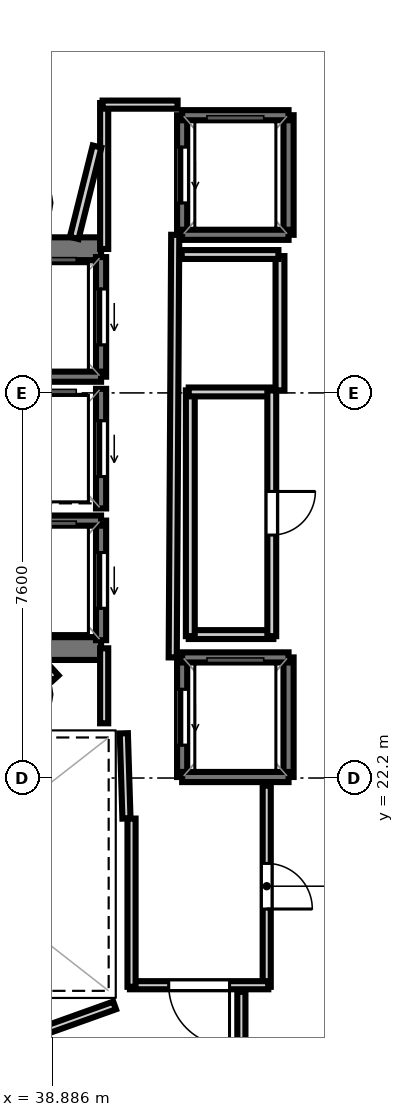
"""IFC4 building model, lengths in metres.
Left out: names, types, materials, properties, quantities, classifications, styles, units other than length and angle.
Written with IfcOpenShell. Run it as: python <this file> out.ifc"""

import sys

from ifc_helpers import new_model, si_unit, direction, frame, frame_2d, origin, place, context, subcontext, project, spatial, rectangle, extrude, element, fill, save


model = new_model("IFC4")
c1 = context("Model", 3, precision=1e-05, world=origin(), true_north=direction((0.0, 1.0)))
c2 = subcontext(c1, "Body", "Model", "MODEL_VIEW")
j1 = project(units=[si_unit("LENGTHUNIT", "METRE"), si_unit("PLANEANGLEUNIT", "RADIAN")], contexts=[c1])
p1 = place(None, origin())
s1 = spatial("IfcSite", under=j1, at=p1, CompositionType="ELEMENT")
p2 = place(p1, origin())
s2 = spatial("IfcBuilding", under=s1, at=p2, CompositionType="ELEMENT")
p3 = place(p2, frame((0.0, 0.0, 310.2)))
s3 = spatial("IfcBuildingStorey", under=s2, at=p3, CompositionType="ELEMENT", Elevation=310.2)
p4 = place(p3, frame((29.33, 32.645, 0.0), z_axis=(0.0, 0.0, 1.0), x_axis=(1.0, 0.0, 0.0)))
e1 = element("IfcWall", 1, at=p4, inside=s3, PredefinedType="SHEAR", context=c2, shape_type="SweptSolid", body=[
    extrude(rectangle(XDim=10.52, YDim=0.45, at=frame_2d((5.26, 0.0))), origin(), (0.0, 0.0, 1.0), 3.52),
])
p5 = place(p4, frame((0.895, 0.0, 0.0)))
e2 = element("IfcOpeningElement", 2, at=p5, cuts=e1, PredefinedType="OPENING", context=c2, shape_type="SweptSolid", body=[
    extrude(rectangle(XDim=1.25, YDim=2.15, at=frame_2d((0.625, 1.075))), frame((0.0, 0.235, 0.0), z_axis=(0.0, -1.0, 0.0), x_axis=(1.0, 0.0, 0.0)), (0.0, 0.0, 1.0), 0.47),
])
p6 = place(p3, frame((29.33, 24.755, 0.0), z_axis=(0.0, 0.0, 1.0), x_axis=(1.0, 0.0, 0.0)))
e3 = element("IfcWall", 3, at=p6, inside=s3, PredefinedType="SHEAR", context=c2, shape_type="SweptSolid", body=[
    extrude(rectangle(XDim=10.52, YDim=0.45, at=frame_2d((5.26, 0.0))), origin(), (0.0, 0.0, 1.0), 3.52),
])
p7 = place(p6, frame((0.695, 0.0, 0.0)))
e4 = element("IfcOpeningElement", 4, at=p7, cuts=e3, PredefinedType="OPENING", context=c2, shape_type="SweptSolid", body=[
    extrude(rectangle(XDim=1.25, YDim=2.15, at=frame_2d((0.625, 1.075))), frame((0.0, 0.235, 0.0), z_axis=(0.0, -1.0, 0.0), x_axis=(1.0, 0.0, 0.0)), (0.0, 0.0, 1.0), 0.47),
])
p8 = place(p3, frame((39.85, 30.12, 0.0), z_axis=(0.0, 0.0, 1.0), x_axis=(0.0, 1.0, 0.0)))
e5 = element("IfcWall", 5, at=p8, inside=s3, PredefinedType="SOLIDWALL", context=c2, shape_type="SweptSolid", body=[
    extrude(rectangle(XDim=2.36, YDim=0.2, at=frame_2d((1.18, 0.0))), origin(), (0.0, 0.0, 1.0), 3.52),
])
p9 = place(p8, frame((0.63, 0.0, 0.0)))
e6 = element("IfcOpeningElement", 6, at=p9, cuts=e5, PredefinedType="OPENING", context=c2, shape_type="SweptSolid", body=[
    extrude(rectangle(XDim=1.1, YDim=2.15, at=frame_2d((0.55, 1.075))), frame((0.0, 0.11, 0.0), z_axis=(0.0, -1.0, 0.0), x_axis=(1.0, 0.0, 0.0)), (0.0, 0.0, 1.0), 0.22),
])
p10 = place(p3, frame((37.75, 30.12, 0.0), z_axis=(0.0, 0.0, 1.0), x_axis=(1.0, 0.0, 0.0)))
e7 = element("IfcWall", 7, at=p10, inside=s3, PredefinedType="SOLIDWALL", context=c2, shape_type="SweptSolid", body=[
    extrude(rectangle(XDim=2.1, YDim=0.2, at=frame_2d((1.05, 0.0))), origin(), (0.0, 0.0, 1.0), 3.52),
])
p11 = place(p3, frame((39.85, 24.92, 0.0), z_axis=(0.0, 0.0, 1.0), x_axis=(0.0, 1.0, 0.0)))
e8 = element("IfcWall", 8, at=p11, inside=s3, PredefinedType="SOLIDWALL", context=c2, shape_type="SweptSolid", body=[
    extrude(rectangle(XDim=2.36, YDim=0.2, at=frame_2d((1.18, 0.0))), origin(), (0.0, 0.0, 1.0), 3.52),
])
p12 = place(p11, frame((0.63, 0.0, 0.0)))
e9 = element("IfcOpeningElement", 9, at=p12, cuts=e8, PredefinedType="OPENING", context=c2, shape_type="SweptSolid", body=[
    extrude(rectangle(XDim=1.1, YDim=2.15, at=frame_2d((0.55, 1.075))), frame((0.0, 0.11, 0.0), z_axis=(0.0, -1.0, 0.0), x_axis=(1.0, 0.0, 0.0)), (0.0, 0.0, 1.0), 0.22),
])
p13 = place(p3, frame((37.75, 27.28, 0.0), z_axis=(0.0, 0.0, 1.0), x_axis=(1.0, 0.0, 0.0)))
e10 = element("IfcWall", 10, at=p13, inside=s3, PredefinedType="SOLIDWALL", context=c2, shape_type="SweptSolid", body=[
    extrude(rectangle(XDim=2.1, YDim=0.2, at=frame_2d((1.05, 0.0))), origin(), (0.0, 0.0, 1.0), 3.52),
])
p14 = place(p3, frame((39.85, 27.52, 0.0), z_axis=(0.0, 0.0, 1.0), x_axis=(0.0, 1.0, 0.0)))
e11 = element("IfcWall", 11, at=p14, inside=s3, PredefinedType="SOLIDWALL", context=c2, shape_type="SweptSolid", body=[
    extrude(rectangle(XDim=2.36, YDim=0.2, at=frame_2d((1.18, 0.0))), origin(), (0.0, 0.0, 1.0), 3.52),
])
p15 = place(p14, frame((0.63, 0.0, 0.0)))
e12 = element("IfcOpeningElement", 12, at=p15, cuts=e11, PredefinedType="OPENING", context=c2, shape_type="SweptSolid", body=[
    extrude(rectangle(XDim=1.1, YDim=2.15, at=frame_2d((0.55, 1.075))), frame((0.0, 0.11, 0.0), z_axis=(0.0, -1.0, 0.0), x_axis=(1.0, 0.0, 0.0)), (0.0, 0.0, 1.0), 0.22),
])
p16 = place(p3, frame((43.55, 22.22, 0.0), z_axis=(0.0, 0.0, 1.0), x_axis=(0.0, 1.0, 0.0)))
e13 = element("IfcWall", 13, at=p16, inside=s3, PredefinedType="SOLIDWALL", context=c2, shape_type="SweptSolid", body=[
    extrude(rectangle(XDim=2.36, YDim=0.2, at=frame_2d((1.18, 0.0))), origin(), (0.0, 0.0, 1.0), 3.52),
])
p17 = place(p3, frame((41.45, 22.22, 0.0), z_axis=(0.0, 0.0, 1.0), x_axis=(0.0, 1.0, 0.0)))
e14 = element("IfcWall", 14, at=p17, inside=s3, PredefinedType="SOLIDWALL", context=c2, shape_type="SweptSolid", body=[
    extrude(rectangle(XDim=2.36, YDim=0.2, at=frame_2d((1.18, 0.0))), origin(), (0.0, 0.0, 1.0), 3.52),
])
p18 = place(p17, frame((0.63, 0.0, 0.0)))
e15 = element("IfcOpeningElement", 15, at=p18, cuts=e14, PredefinedType="OPENING", context=c2, shape_type="SweptSolid", body=[
    extrude(rectangle(XDim=1.1, YDim=2.15, at=frame_2d((0.55, 1.075))), frame((0.0, 0.11, 0.0), z_axis=(0.0, -1.0, 0.0), x_axis=(1.0, 0.0, 0.0)), (0.0, 0.0, 1.0), 0.22),
])
for number, where, z_axis, x_axis in (
    (16, (41.45, 24.58, 0.0), (0.0, 0.0, 1.0), (1.0, 0.0, 0.0)),
    (17, (41.45, 22.22, 0.0), (0.0, 0.0, 1.0), (1.0, 0.0, 0.0)),
):
    element("IfcWall", number, at=place(p3, frame(where, z_axis=z_axis, x_axis=x_axis)), inside=s3, PredefinedType="SOLIDWALL", context=c2, shape_type="SweptSolid", body=[
        extrude(rectangle(XDim=2.1, YDim=0.2, at=frame_2d((1.05, 0.0))), origin(), (0.0, 0.0, 1.0), 3.52),
    ])
p19 = place(p3, frame((43.55, 32.92, 0.0), z_axis=(0.0, 0.0, 1.0), x_axis=(0.0, 1.0, 0.0)))
e18 = element("IfcWall", 18, at=p19, inside=s3, PredefinedType="SOLIDWALL", context=c2, shape_type="SweptSolid", body=[
    extrude(rectangle(XDim=2.36, YDim=0.2, at=frame_2d((1.18, 0.0))), origin(), (0.0, 0.0, 1.0), 3.52),
])
p20 = place(p3, frame((41.45, 32.92, 0.0), z_axis=(0.0, 0.0, 1.0), x_axis=(0.0, 1.0, 0.0)))
e19 = element("IfcWall", 19, at=p20, inside=s3, PredefinedType="SOLIDWALL", context=c2, shape_type="SweptSolid", body=[
    extrude(rectangle(XDim=2.36, YDim=0.2, at=frame_2d((1.18, 0.0))), origin(), (0.0, 0.0, 1.0), 3.52),
])
p21 = place(p20, frame((0.63, 0.0, 0.0)))
e20 = element("IfcOpeningElement", 20, at=p21, cuts=e19, PredefinedType="OPENING", context=c2, shape_type="SweptSolid", body=[
    extrude(rectangle(XDim=1.1, YDim=2.15, at=frame_2d((0.55, 1.075))), frame((0.0, 0.11, 0.0), z_axis=(0.0, -1.0, 0.0), x_axis=(1.0, 0.0, 0.0)), (0.0, 0.0, 1.0), 0.22),
])
for number, where, z_axis, x_axis in (
    (21, (41.45, 35.28, 0.0), (0.0, 0.0, 1.0), (1.0, 0.0, 0.0)),
    (22, (41.45, 32.92, 0.0), (0.0, 0.0, 1.0), (1.0, 0.0, 0.0)),
):
    element("IfcWall", number, at=place(p3, frame(where, z_axis=z_axis, x_axis=x_axis)), inside=s3, PredefinedType="SOLIDWALL", context=c2, shape_type="SweptSolid", body=[
        extrude(rectangle(XDim=2.1, YDim=0.2, at=frame_2d((1.05, 0.0))), origin(), (0.0, 0.0, 1.0), 3.52),
    ])
p22 = place(p3, frame((40.351, 21.401, 0.0), z_axis=(0.0, 0.0, 1.0), x_axis=(-0.031058045979, 0.999517582527, 0.0)))
e23 = element("IfcWall", 23, at=p22, inside=s3, PredefinedType="PARTITIONING", context=c2, shape_type="SweptSolid", body=[
    extrude(rectangle(XDim=1.682, YDim=0.16, at=frame_2d((0.841, 0.0))), origin(), (0.0, 0.0, 1.0), 2.84),
])
p23 = place(p3, frame((39.911, 23.28, 0.0), z_axis=(0.0, 0.0, 1.0), x_axis=(0.0, 1.0, 0.0)))
e24 = element("IfcWall", 24, at=p23, inside=s3, PredefinedType="PARTITIONING", context=c2, shape_type="SweptSolid", body=[
    extrude(rectangle(XDim=1.48, YDim=0.16, at=frame_2d((0.74, 0.0))), origin(), (0.0, 0.0, 1.0), 2.84),
])
p24 = place(p3, frame((39.911, 32.64, 0.0), z_axis=(0.0, 0.0, 1.0), x_axis=(0.0, 1.0, 0.0)))
e25 = element("IfcWall", 25, at=p24, inside=s3, PredefinedType="PARTITIONING", context=c2, shape_type="SweptSolid", body=[
    extrude(rectangle(XDim=2.88, YDim=0.16, at=frame_2d((1.44, 0.0))), origin(), (0.0, 0.0, 1.0), 2.84),
])
p25 = place(p3, frame((39.88, 35.489, 0.0), z_axis=(0.0, 0.0, 1.0), x_axis=(1.0, 0.0, 0.0)))
e26 = element("IfcWall", 26, at=p25, inside=s3, PredefinedType="PARTITIONING", context=c2, shape_type="SweptSolid", body=[
    extrude(rectangle(XDim=1.48, YDim=0.16, at=frame_2d((0.74, 0.0))), origin(), (0.0, 0.0, 1.0), 2.84),
])
p26 = place(p3, frame((41.313, 32.92, 0.0), z_axis=(0.0, 0.0, 1.0), x_axis=(-0.005942518022, -0.999982343084, 0.0)))
e27 = element("IfcWall", 27, at=p26, inside=s3, PredefinedType="PARTITIONING", context=c2, shape_type="SweptSolid", body=[
    extrude(rectangle(XDim=8.34, YDim=0.16, at=frame_2d((4.17, 0.0))), origin(), (0.0, 0.0, 1.0), 2.84),
])
p27 = place(p3, frame((43.119, 22.05, 0.0), z_axis=(0.0, 0.0, 1.0), x_axis=(0.0, -1.0, 0.0)))
e28 = element("IfcWall", 28, at=p27, inside=s3, PredefinedType="PARTITIONING", context=c2, shape_type="SweptSolid", body=[
    extrude(rectangle(XDim=3.97, YDim=0.16, at=frame_2d((1.985, 0.0))), origin(), (0.0, 0.0, 1.0), 2.84),
])
p28 = place(p27, frame((1.535, 0.0, 0.0)))
e29 = element("IfcOpeningElement", 29, at=p28, cuts=e28, PredefinedType="OPENING", context=c2, shape_type="SweptSolid", body=[
    extrude(rectangle(XDim=0.9, YDim=2.1, at=frame_2d((0.45, 1.05))), frame((0.0, 0.09, 0.0), z_axis=(0.0, -1.0, 0.0), x_axis=(1.0, 0.0, 0.0)), (0.0, 0.0, 1.0), 0.18),
])
p29 = place(p3, frame((43.15, 18.111, 0.0), z_axis=(0.0, 0.0, 1.0), x_axis=(-1.0, 0.0, 0.0)))
e30 = element("IfcWall", 30, at=p29, inside=s3, PredefinedType="PARTITIONING", context=c2, shape_type="SweptSolid", body=[
    extrude(rectangle(XDim=2.73, YDim=0.16, at=frame_2d((1.365, 0.0))), origin(), (0.0, 0.0, 1.0), 2.84),
])
p30 = place(p29, frame((0.765, 0.0, 0.0)))
e31 = element("IfcOpeningElement", 31, at=p30, cuts=e30, PredefinedType="OPENING", context=c2, shape_type="SweptSolid", body=[
    extrude(rectangle(XDim=1.2, YDim=2.15, at=frame_2d((0.6, 1.075))), frame((0.0, 0.09, 0.0), z_axis=(0.0, -1.0, 0.0), x_axis=(1.0, 0.0, 0.0)), (0.0, 0.0, 1.0), 0.18),
])
p31 = place(p3, frame((40.451, 18.08, 0.0), z_axis=(0.0, 0.0, 1.0), x_axis=(0.0, 1.0, 0.0)))
e32 = element("IfcWall", 32, at=p31, inside=s3, PredefinedType="PARTITIONING", context=c2, shape_type="SweptSolid", body=[
    extrude(rectangle(XDim=3.32, YDim=0.16, at=frame_2d((1.66, 0.0))), origin(), (0.0, 0.0, 1.0), 2.84),
])
p32 = place(p3, frame((43.25, 25.031, 0.0), z_axis=(0.0, 0.0, 1.0), x_axis=(-1.0, 0.0, 0.0)))
e33 = element("IfcWall", 33, at=p32, inside=s3, PredefinedType="PLUMBINGWALL", context=c2, shape_type="SweptSolid", body=[
    extrude(rectangle(XDim=1.67, YDim=0.175, at=frame_2d((0.835, 0.0))), origin(), (0.0, 0.0, 1.0), 2.84),
])
p33 = place(p3, frame((41.611, 25.0, 0.0), z_axis=(0.0, 0.0, 1.0), x_axis=(0.0, 1.0, 0.0)))
e34 = element("IfcWall", 34, at=p33, inside=s3, PredefinedType="PLUMBINGWALL", context=c2, shape_type="SweptSolid", body=[
    extrude(rectangle(XDim=4.85, YDim=0.175, at=frame_2d((2.425, 0.0))), origin(), (0.0, 0.0, 1.0), 2.84),
])
p34 = place(p3, frame((41.58, 29.819, 0.0), z_axis=(0.0, 0.0, 1.0), x_axis=(1.0, 0.0, 0.0)))
e35 = element("IfcWall", 35, at=p34, inside=s3, PredefinedType="PLUMBINGWALL", context=c2, shape_type="SweptSolid", body=[
    extrude(rectangle(XDim=1.67, YDim=0.175, at=frame_2d((0.835, 0.0))), origin(), (0.0, 0.0, 1.0), 2.84),
])
p35 = place(p3, frame((43.219, 29.85, 0.0), z_axis=(0.0, 0.0, 1.0), x_axis=(0.0, -1.0, 0.0)))
e36 = element("IfcWall", 36, at=p35, inside=s3, PredefinedType="PLUMBINGWALL", context=c2, shape_type="SweptSolid", body=[
    extrude(rectangle(XDim=4.85, YDim=0.175, at=frame_2d((2.425, 0.0))), origin(), (0.0, 0.0, 1.0), 2.84),
])
p36 = place(p35, frame((1.995, 0.0, 0.0)))
e37 = element("IfcOpeningElement", 37, at=p36, cuts=e36, PredefinedType="OPENING", context=c2, shape_type="SweptSolid", body=[
    extrude(rectangle(XDim=0.86, YDim=2.05, at=frame_2d((0.43, 1.025))), frame((0.0, 0.097, 0.0), z_axis=(0.0, -1.0, 0.0), x_axis=(1.0, 0.0, 0.0)), (0.0, 0.0, 1.0), 0.195),
])
p37 = place(p3, frame((38.951, 24.171, 0.0), z_axis=(0.0, 0.0, 1.0), x_axis=(-0.674186852077, 0.738560822469, 0.0)))
e38 = element("IfcWall", 38, at=p37, inside=s3, PredefinedType="PARTITIONING", context=c2, shape_type="SweptSolid", body=[
    extrude(rectangle(XDim=0.281, YDim=0.16, at=frame_2d((0.14, 0.0))), origin(), (0.0, 0.0, 1.0), 2.84),
])
p38 = place(p3, frame((36.81, 16.529, 0.0), z_axis=(0.0, 0.0, 1.0), x_axis=(0.941548344365, 0.33687789364, 0.0)))
e39 = element("IfcWall", 39, at=p38, inside=s3, PredefinedType="PARTITIONING", context=c2, shape_type="SweptSolid", body=[
    extrude(rectangle(XDim=3.513, YDim=0.16, at=frame_2d((1.756, 0.0))), origin(), (0.0, 0.0, 1.0), 2.84),
])
p39 = place(p3, frame((42.619, 17.98, 0.0), z_axis=(0.0, 0.0, 1.0), x_axis=(0.0, -1.0, 0.0)))
e40 = element("IfcWall", 40, at=p39, inside=s3, PredefinedType="PARTITIONING", context=c2, shape_type="SweptSolid", body=[
    extrude(rectangle(XDim=1.93, YDim=0.16, at=frame_2d((0.965, 0.0))), origin(), (0.0, 0.0, 1.0), 2.84),
])
p40 = place(p3, frame((39.77, 34.662, 0.0), z_axis=(0.0, 0.0, 1.0), x_axis=(-0.241886708188, -0.970304498805, 0.0)))
e41 = element("IfcWall", 41, at=p40, inside=s3, PredefinedType="PLUMBINGWALL", context=c2, shape_type="SweptSolid", body=[
    extrude(rectangle(XDim=1.859, YDim=0.175, at=frame_2d((0.93, 0.0))), origin(), (0.0, 0.0, 1.0), 2.84),
])
p41 = place(p3, frame((43.381, 29.85, 0.0), z_axis=(0.0, 0.0, 1.0), x_axis=(0.0, 1.0, 0.0)))
e42 = element("IfcWall", 42, at=p41, inside=s3, PredefinedType="PLUMBINGWALL", context=c2, shape_type="SweptSolid", body=[
    extrude(rectangle(XDim=2.65, YDim=0.175, at=frame_2d((1.325, 0.0))), origin(), (0.0, 0.0, 1.0), 2.84),
])
p42 = place(p3, frame((43.35, 32.531, 0.0), z_axis=(0.0, 0.0, 1.0), x_axis=(-1.0, 0.0, 0.0)))
e43 = element("IfcWall", 43, at=p42, inside=s3, PredefinedType="PLUMBINGWALL", context=c2, shape_type="SweptSolid", body=[
    extrude(rectangle(XDim=1.91, YDim=0.175, at=frame_2d((0.955, 0.0))), origin(), (0.0, 0.0, 1.0), 2.84),
])
p43 = place(p9, origin())
e44 = element("IfcDoor", 44, at=p43, inside=s3, OperationType="SLIDING_TO_LEFT", PredefinedType="DOOR", context=c2, shape_type="SweptSolid", body=[
    extrude(rectangle(XDim=1.1, YDim=2.15, at=frame_2d((0.55, 1.075))), frame((0.0, 0.025, 0.0), z_axis=(0.0, -1.0, 0.0), x_axis=(1.0, 0.0, 0.0)), (0.0, 0.0, 1.0), 0.05),
])
fill(e6, e44)
p44 = place(p12, origin())
e45 = element("IfcDoor", 45, at=p44, inside=s3, OperationType="SLIDING_TO_LEFT", PredefinedType="DOOR", context=c2, shape_type="SweptSolid", body=[
    extrude(rectangle(XDim=1.1, YDim=2.15, at=frame_2d((0.55, 1.075))), frame((0.0, 0.025, 0.0), z_axis=(0.0, -1.0, 0.0), x_axis=(1.0, 0.0, 0.0)), (0.0, 0.0, 1.0), 0.05),
])
fill(e9, e45)
p45 = place(p15, origin())
e46 = element("IfcDoor", 46, at=p45, inside=s3, OperationType="SLIDING_TO_LEFT", PredefinedType="DOOR", context=c2, shape_type="SweptSolid", body=[
    extrude(rectangle(XDim=1.1, YDim=2.15, at=frame_2d((0.55, 1.075))), frame((0.0, 0.025, 0.0), z_axis=(0.0, -1.0, 0.0), x_axis=(1.0, 0.0, 0.0)), (0.0, 0.0, 1.0), 0.05),
])
fill(e12, e46)
p46 = place(p18, origin())
e47 = element("IfcDoor", 47, at=p46, inside=s3, OperationType="SLIDING_TO_LEFT", PredefinedType="DOOR", context=c2, shape_type="SweptSolid", body=[
    extrude(rectangle(XDim=1.1, YDim=2.15, at=frame_2d((0.55, 1.075))), frame((0.0, 0.025, 0.0), z_axis=(0.0, -1.0, 0.0), x_axis=(1.0, 0.0, 0.0)), (0.0, 0.0, 1.0), 0.05),
])
fill(e15, e47)
p47 = place(p21, origin())
e48 = element("IfcDoor", 48, at=p47, inside=s3, OperationType="SLIDING_TO_LEFT", PredefinedType="DOOR", context=c2, shape_type="SweptSolid", body=[
    extrude(rectangle(XDim=1.1, YDim=2.15, at=frame_2d((0.55, 1.075))), frame((0.0, 0.025, 0.0), z_axis=(0.0, -1.0, 0.0), x_axis=(1.0, 0.0, 0.0)), (0.0, 0.0, 1.0), 0.05),
])
fill(e20, e48)
p48 = place(p30, origin())
e49 = element("IfcDoor", 49, at=p48, inside=s3, OperationType="SINGLE_SWING_LEFT", PredefinedType="DOOR", context=c2, shape_type="SweptSolid", body=[
    extrude(rectangle(XDim=1.2, YDim=2.15, at=frame_2d((0.6, 1.075))), frame((0.0, 0.025, 0.0), z_axis=(0.0, -1.0, 0.0), x_axis=(1.0, 0.0, 0.0)), (0.0, 0.0, 1.0), 0.05),
])
fill(e31, e49)
p49 = place(p28, origin())
e50 = element("IfcDoor", 50, at=p49, inside=s3, OperationType="SINGLE_SWING_RIGHT", PredefinedType="DOOR", context=c2, shape_type="SweptSolid", body=[
    extrude(rectangle(XDim=0.9, YDim=2.1, at=frame_2d((0.45, 1.05))), frame((0.0, 0.025, 0.0), z_axis=(0.0, -1.0, 0.0), x_axis=(1.0, 0.0, 0.0)), (0.0, 0.0, 1.0), 0.05),
])
fill(e29, e50)
p50 = place(p36, origin())
e51 = element("IfcDoor", 51, at=p50, inside=s3, OperationType="SINGLE_SWING_LEFT", PredefinedType="DOOR", context=c2, shape_type="SweptSolid", body=[
    extrude(rectangle(XDim=0.86, YDim=2.05, at=frame_2d((0.43, 1.025))), frame((0.0, 0.025, 0.0), z_axis=(0.0, -1.0, 0.0), x_axis=(1.0, 0.0, 0.0)), (0.0, 0.0, 1.0), 0.05),
])
fill(e37, e51)
save(model, sys.argv[1])
